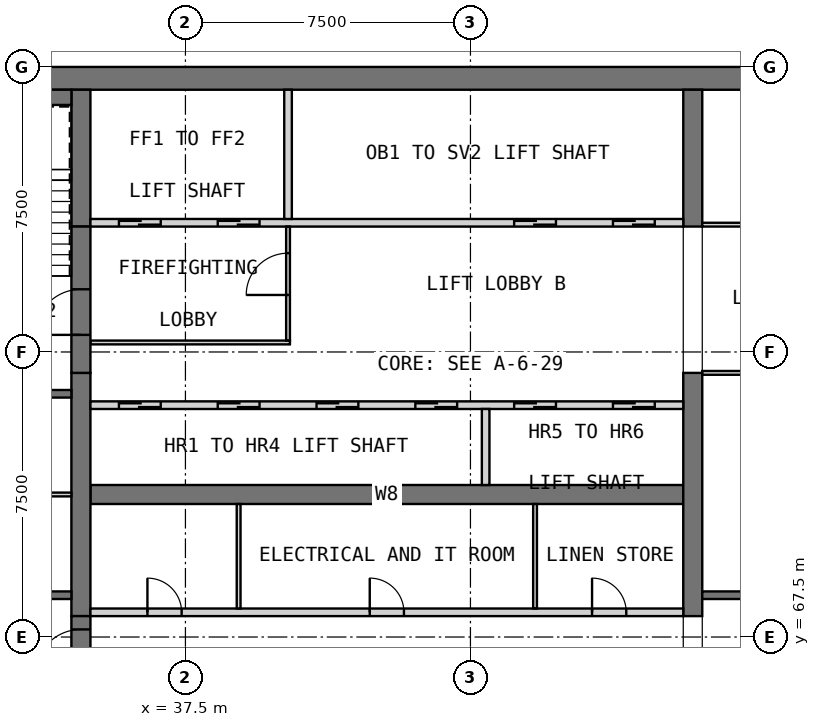
"""IFC4 building model, lengths in metres.
Left out: names, types, materials, properties, quantities, classifications, styles, units other than length and angle.
Written with IfcOpenShell. Run it as: python <this file> out.ifc"""

import sys

from ifc_helpers import new_model, si_unit, direction, frame, frame_2d, origin, place, context, subcontext, project, spatial, rectangle, extrude, element, fill, save


model = new_model("IFC4")
c1 = context("Model", 3, precision=1e-05, world=origin(), true_north=direction((0.0, 1.0)))
c2 = subcontext(c1, "Body", "Model", "MODEL_VIEW")
j1 = project(units=[si_unit("LENGTHUNIT", "METRE"), si_unit("PLANEANGLEUNIT", "RADIAN")], contexts=[c1])
p1 = place(None, origin())
s1 = spatial("IfcSite", under=j1, at=p1, CompositionType="ELEMENT")
p2 = place(p1, origin())
s2 = spatial("IfcBuilding", under=s1, at=p2, CompositionType="ELEMENT")
p3 = place(p2, frame((0.0, 0.0, 219.7)))
s3 = spatial("IfcBuildingStorey", under=s2, at=p3, CompositionType="ELEMENT", Elevation=219.7)
p4 = place(p3, frame((30.0, 82.2, 0.0), z_axis=(0.0, 0.0, 1.0), x_axis=(1.0, 0.0, 0.0)))
e1 = element("IfcWall", 1, at=p4, inside=s3, PredefinedType="SHEAR", context=c2, shape_type="SweptSolid", body=[
    extrude(rectangle(XDim=30.0, YDim=0.6, at=frame_2d((15.0, 0.0))), origin(), (0.0, 0.0, 1.0), 3.5),
])
p5 = place(p3, frame((35.0, 71.25, 0.0), z_axis=(0.0, 0.0, 1.0), x_axis=(1.0, 0.0, 0.0)))
e2 = element("IfcWall", 2, at=p5, inside=s3, PredefinedType="SHEAR", context=c2, shape_type="SweptSolid", body=[
    extrude(rectangle(XDim=15.6, YDim=0.5, at=frame_2d((7.8, 0.0))), origin(), (0.0, 0.0, 1.0), 3.5),
])
p6 = place(p3, frame((34.75, 68.05, 0.0), z_axis=(0.0, 0.0, 1.0), x_axis=(0.0, 1.0, 0.0)))
e3 = element("IfcWall", 3, at=p6, inside=s3, PredefinedType="SHEAR", context=c2, shape_type="SweptSolid", body=[
    extrude(rectangle(XDim=6.4, YDim=0.5, at=frame_2d((3.2, 0.0))), origin(), (0.0, 0.0, 1.0), 3.5),
])
p7 = place(p3, frame((34.75, 78.3, 0.0), z_axis=(0.0, 0.0, 1.0), x_axis=(0.0, 1.0, 0.0)))
e4 = element("IfcWall", 4, at=p7, inside=s3, PredefinedType="SHEAR", context=c2, shape_type="SweptSolid", body=[
    extrude(rectangle(XDim=3.6, YDim=0.5, at=frame_2d((1.8, 0.0))), origin(), (0.0, 0.0, 1.0), 3.5),
])
p8 = place(p3, frame((50.85, 68.05, 0.0), z_axis=(0.0, 0.0, 1.0), x_axis=(0.0, 1.0, 0.0)))
e5 = element("IfcWall", 5, at=p8, inside=s3, PredefinedType="SHEAR", context=c2, shape_type="SweptSolid", body=[
    extrude(rectangle(XDim=6.4, YDim=0.5, at=frame_2d((3.2, 0.0))), origin(), (0.0, 0.0, 1.0), 3.5),
])
p9 = place(p3, frame((50.85, 78.3, 0.0), z_axis=(0.0, 0.0, 1.0), x_axis=(0.0, 1.0, 0.0)))
e6 = element("IfcWall", 6, at=p9, inside=s3, PredefinedType="SHEAR", context=c2, shape_type="SweptSolid", body=[
    extrude(rectangle(XDim=3.6, YDim=0.5, at=frame_2d((1.8, 0.0))), origin(), (0.0, 0.0, 1.0), 3.5),
])
p10 = place(p3, frame((35.0, 68.15, 0.0), z_axis=(0.0, 0.0, 1.0), x_axis=(1.0, 0.0, 0.0)))
e7 = element("IfcWall", 7, at=p10, inside=s3, PredefinedType="PARTITIONING", context=c2, shape_type="SweptSolid", body=[
    extrude(rectangle(XDim=15.6, YDim=0.2, at=frame_2d((7.8, 0.0))), origin(), (0.0, 0.0, 1.0), 3.25),
])
p11 = place(p10, frame((1.5, 0.0, 0.0)))
e8 = element("IfcOpeningElement", 8, at=p11, cuts=e7, PredefinedType="OPENING", context=c2, shape_type="SweptSolid", body=[
    extrude(rectangle(XDim=0.9, YDim=2.1, at=frame_2d((0.45, 1.05))), frame((0.0, 0.11, 0.0), z_axis=(0.0, -1.0, 0.0), x_axis=(1.0, 0.0, 0.0)), (0.0, 0.0, 1.0), 0.22),
])
p12 = place(p10, frame((7.35, 0.0, 0.0)))
e9 = element("IfcOpeningElement", 9, at=p12, cuts=e7, PredefinedType="OPENING", context=c2, shape_type="SweptSolid", body=[
    extrude(rectangle(XDim=0.9, YDim=2.1, at=frame_2d((0.45, 1.05))), frame((0.0, 0.11, 0.0), z_axis=(0.0, -1.0, 0.0), x_axis=(1.0, 0.0, 0.0)), (0.0, 0.0, 1.0), 0.22),
])
p13 = place(p10, frame((13.2, 0.0, 0.0)))
e10 = element("IfcOpeningElement", 10, at=p13, cuts=e7, PredefinedType="OPENING", context=c2, shape_type="SweptSolid", body=[
    extrude(rectangle(XDim=0.9, YDim=2.1, at=frame_2d((0.45, 1.05))), frame((0.0, 0.11, 0.0), z_axis=(0.0, -1.0, 0.0), x_axis=(1.0, 0.0, 0.0)), (0.0, 0.0, 1.0), 0.22),
])
for number, where, z_axis, x_axis in (
    (11, (38.9, 68.25, 0.0), (0.0, 0.0, 1.0), (0.0, 1.0, 0.0)),
    (12, (46.7, 68.25, 0.0), (0.0, 0.0, 1.0), (0.0, 1.0, 0.0)),
):
    element("IfcWall", number, at=place(p3, frame(where, z_axis=z_axis, x_axis=x_axis)), inside=s3, PredefinedType="PARTITIONING", context=c2, shape_type="SweptSolid", body=[
        extrude(rectangle(XDim=2.75, YDim=0.1, at=frame_2d((1.375, 0.0))), origin(), (0.0, 0.0, 1.0), 3.25),
    ])
p14 = place(p3, frame((35.0, 73.6, 0.0), z_axis=(0.0, 0.0, 1.0), x_axis=(1.0, 0.0, 0.0)))
e13 = element("IfcWall", 13, at=p14, inside=s3, PredefinedType="SOLIDWALL", context=c2, shape_type="SweptSolid", body=[
    extrude(rectangle(XDim=15.6, YDim=0.2, at=frame_2d((7.8, 0.0))), origin(), (0.0, 0.0, 1.0), 3.5),
])
p15 = place(p14, frame((0.75, 0.0, 0.0)))
e14 = element("IfcOpeningElement", 14, at=p15, cuts=e13, PredefinedType="OPENING", context=c2, shape_type="SweptSolid", body=[
    extrude(rectangle(XDim=1.1, YDim=2.1, at=frame_2d((0.55, 1.05))), frame((0.0, 0.11, 0.0), z_axis=(0.0, -1.0, 0.0), x_axis=(1.0, 0.0, 0.0)), (0.0, 0.0, 1.0), 0.22),
])
p16 = place(p14, frame((3.35, 0.0, 0.0)))
e15 = element("IfcOpeningElement", 15, at=p16, cuts=e13, PredefinedType="OPENING", context=c2, shape_type="SweptSolid", body=[
    extrude(rectangle(XDim=1.1, YDim=2.1, at=frame_2d((0.55, 1.05))), frame((0.0, 0.11, 0.0), z_axis=(0.0, -1.0, 0.0), x_axis=(1.0, 0.0, 0.0)), (0.0, 0.0, 1.0), 0.22),
])
p17 = place(p14, frame((5.95, 0.0, 0.0)))
e16 = element("IfcOpeningElement", 16, at=p17, cuts=e13, PredefinedType="OPENING", context=c2, shape_type="SweptSolid", body=[
    extrude(rectangle(XDim=1.1, YDim=2.1, at=frame_2d((0.55, 1.05))), frame((0.0, 0.11, 0.0), z_axis=(0.0, -1.0, 0.0), x_axis=(1.0, 0.0, 0.0)), (0.0, 0.0, 1.0), 0.22),
])
p18 = place(p14, frame((8.55, 0.0, 0.0)))
e17 = element("IfcOpeningElement", 17, at=p18, cuts=e13, PredefinedType="OPENING", context=c2, shape_type="SweptSolid", body=[
    extrude(rectangle(XDim=1.1, YDim=2.1, at=frame_2d((0.55, 1.05))), frame((0.0, 0.11, 0.0), z_axis=(0.0, -1.0, 0.0), x_axis=(1.0, 0.0, 0.0)), (0.0, 0.0, 1.0), 0.22),
])
p19 = place(p14, frame((11.15, 0.0, 0.0)))
e18 = element("IfcOpeningElement", 18, at=p19, cuts=e13, PredefinedType="OPENING", context=c2, shape_type="SweptSolid", body=[
    extrude(rectangle(XDim=1.1, YDim=2.1, at=frame_2d((0.55, 1.05))), frame((0.0, 0.11, 0.0), z_axis=(0.0, -1.0, 0.0), x_axis=(1.0, 0.0, 0.0)), (0.0, 0.0, 1.0), 0.22),
])
p20 = place(p14, frame((13.75, 0.0, 0.0)))
e19 = element("IfcOpeningElement", 19, at=p20, cuts=e13, PredefinedType="OPENING", context=c2, shape_type="SweptSolid", body=[
    extrude(rectangle(XDim=1.1, YDim=2.1, at=frame_2d((0.55, 1.05))), frame((0.0, 0.11, 0.0), z_axis=(0.0, -1.0, 0.0), x_axis=(1.0, 0.0, 0.0)), (0.0, 0.0, 1.0), 0.22),
])
p21 = place(p3, frame((45.4, 71.5, 0.0), z_axis=(0.0, 0.0, 1.0), x_axis=(0.0, 1.0, 0.0)))
e20 = element("IfcWall", 20, at=p21, inside=s3, PredefinedType="SOLIDWALL", context=c2, shape_type="SweptSolid", body=[
    extrude(rectangle(XDim=2.0, YDim=0.2, at=frame_2d((1.0, 0.0))), origin(), (0.0, 0.0, 1.0), 3.5),
])
p22 = place(p3, frame((35.0, 78.4, 0.0), z_axis=(0.0, 0.0, 1.0), x_axis=(1.0, 0.0, 0.0)))
e21 = element("IfcWall", 21, at=p22, inside=s3, PredefinedType="SOLIDWALL", context=c2, shape_type="SweptSolid", body=[
    extrude(rectangle(XDim=15.6, YDim=0.2, at=frame_2d((7.8, 0.0))), origin(), (0.0, 0.0, 1.0), 3.5),
])
p23 = place(p22, frame((0.75, 0.0, 0.0)))
e22 = element("IfcOpeningElement", 22, at=p23, cuts=e21, PredefinedType="OPENING", context=c2, shape_type="SweptSolid", body=[
    extrude(rectangle(XDim=1.1, YDim=2.1, at=frame_2d((0.55, 1.05))), frame((0.0, 0.11, 0.0), z_axis=(0.0, -1.0, 0.0), x_axis=(1.0, 0.0, 0.0)), (0.0, 0.0, 1.0), 0.22),
])
p24 = place(p22, frame((3.35, 0.0, 0.0)))
e23 = element("IfcOpeningElement", 23, at=p24, cuts=e21, PredefinedType="OPENING", context=c2, shape_type="SweptSolid", body=[
    extrude(rectangle(XDim=1.1, YDim=2.1, at=frame_2d((0.55, 1.05))), frame((0.0, 0.11, 0.0), z_axis=(0.0, -1.0, 0.0), x_axis=(1.0, 0.0, 0.0)), (0.0, 0.0, 1.0), 0.22),
])
p25 = place(p22, frame((11.15, 0.0, 0.0)))
e24 = element("IfcOpeningElement", 24, at=p25, cuts=e21, PredefinedType="OPENING", context=c2, shape_type="SweptSolid", body=[
    extrude(rectangle(XDim=1.1, YDim=2.1, at=frame_2d((0.55, 1.05))), frame((0.0, 0.11, 0.0), z_axis=(0.0, -1.0, 0.0), x_axis=(1.0, 0.0, 0.0)), (0.0, 0.0, 1.0), 0.22),
])
p26 = place(p22, frame((13.75, 0.0, 0.0)))
e25 = element("IfcOpeningElement", 25, at=p26, cuts=e21, PredefinedType="OPENING", context=c2, shape_type="SweptSolid", body=[
    extrude(rectangle(XDim=1.1, YDim=2.1, at=frame_2d((0.55, 1.05))), frame((0.0, 0.11, 0.0), z_axis=(0.0, -1.0, 0.0), x_axis=(1.0, 0.0, 0.0)), (0.0, 0.0, 1.0), 0.22),
])
p27 = place(p3, frame((40.2, 78.5, 0.0), z_axis=(0.0, 0.0, 1.0), x_axis=(0.0, 1.0, 0.0)))
e26 = element("IfcWall", 26, at=p27, inside=s3, PredefinedType="SOLIDWALL", context=c2, shape_type="SweptSolid", body=[
    extrude(rectangle(XDim=3.4, YDim=0.2, at=frame_2d((1.7, 0.0))), origin(), (0.0, 0.0, 1.0), 3.5),
])
p28 = place(p3, frame((35.0, 75.25, 0.0), z_axis=(0.0, 0.0, 1.0), x_axis=(1.0, 0.0, 0.0)))
e27 = element("IfcWall", 27, at=p28, inside=s3, PredefinedType="PARTITIONING", context=c2, shape_type="SweptSolid", body=[
    extrude(rectangle(XDim=5.25, YDim=0.1, at=frame_2d((2.625, 0.0))), origin(), (0.0, 0.0, 1.0), 3.25),
])
p29 = place(p3, frame((40.2, 75.3, 0.0), z_axis=(0.0, 0.0, 1.0), x_axis=(0.0, 1.0, 0.0)))
e28 = element("IfcWall", 28, at=p29, inside=s3, PredefinedType="PARTITIONING", context=c2, shape_type="SweptSolid", body=[
    extrude(rectangle(XDim=3.0, YDim=0.1, at=frame_2d((1.5, 0.0))), origin(), (0.0, 0.0, 1.0), 3.25),
])
p30 = place(p29, frame((1.2, 0.0, 0.0)))
e29 = element("IfcOpeningElement", 29, at=p30, cuts=e28, PredefinedType="OPENING", context=c2, shape_type="SweptSolid", body=[
    extrude(rectangle(XDim=1.1, YDim=2.1, at=frame_2d((0.55, 1.05))), frame((0.0, 0.06, 0.0), z_axis=(0.0, -1.0, 0.0), x_axis=(1.0, 0.0, 0.0)), (0.0, 0.0, 1.0), 0.12),
])
p31 = place(p3, frame((34.75, 64.2, 0.0), z_axis=(0.0, 0.0, 1.0), x_axis=(0.0, 1.0, 0.0)))
e30 = element("IfcWall", 30, at=p31, inside=s3, PredefinedType="SOLIDWALL", context=c2, shape_type="SweptSolid", body=[
    extrude(rectangle(XDim=3.85, YDim=0.5, at=frame_2d((1.925, 0.0))), origin(), (0.0, 0.0, 1.0), 2.3),
])
p32 = place(p31, frame((2.3, 0.0, 0.0)))
e31 = element("IfcOpeningElement", 31, at=p32, cuts=e30, PredefinedType="OPENING", context=c2, shape_type="SweptSolid", body=[
    extrude(rectangle(XDim=1.2, YDim=2.1, at=frame_2d((0.6, 1.05))), frame((0.0, 0.26, 0.0), z_axis=(0.0, -1.0, 0.0), x_axis=(1.0, 0.0, 0.0)), (0.0, 0.0, 1.0), 0.52),
])
p33 = place(p3, frame((34.75, 74.45, 0.0), z_axis=(0.0, 0.0, 1.0), x_axis=(0.0, 1.0, 0.0)))
e32 = element("IfcWall", 32, at=p33, inside=s3, PredefinedType="SOLIDWALL", context=c2, shape_type="SweptSolid", body=[
    extrude(rectangle(XDim=3.85, YDim=0.5, at=frame_2d((1.925, 0.0))), origin(), (0.0, 0.0, 1.0), 2.3),
])
p34 = place(p33, frame((1.0, 0.0, 0.0)))
e33 = element("IfcOpeningElement", 33, at=p34, cuts=e32, PredefinedType="OPENING", context=c2, shape_type="SweptSolid", body=[
    extrude(rectangle(XDim=1.2, YDim=2.1, at=frame_2d((0.6, 1.05))), frame((0.0, 0.26, 0.0), z_axis=(0.0, -1.0, 0.0), x_axis=(1.0, 0.0, 0.0)), (0.0, 0.0, 1.0), 0.52),
])
p35 = place(p3, frame((30.6, 68.6, 0.0), z_axis=(0.0, 0.0, 1.0), x_axis=(1.0, 0.0, 0.0)))
e34 = element("IfcWall", 34, at=p35, inside=s3, PredefinedType="SOLIDWALL", context=c2, shape_type="SweptSolid", body=[
    extrude(rectangle(XDim=3.9, YDim=0.2, at=frame_2d((1.95, 0.0))), origin(), (0.0, 0.0, 1.0), 3.25),
])
p36 = place(p35, frame((1.7, 0.0, 0.0)))
e35 = element("IfcOpeningElement", 35, at=p36, cuts=e34, PredefinedType="OPENING", context=c2, shape_type="SweptSolid", body=[
    extrude(rectangle(XDim=0.9, YDim=2.1, at=frame_2d((0.45, 1.05))), frame((0.0, 0.11, 0.0), z_axis=(0.0, -1.0, 0.0), x_axis=(1.0, 0.0, 0.0)), (0.0, 0.0, 1.0), 0.22),
])
p37 = place(p3, frame((30.6, 73.9, 0.0), z_axis=(0.0, 0.0, 1.0), x_axis=(1.0, 0.0, 0.0)))
e36 = element("IfcWall", 36, at=p37, inside=s3, PredefinedType="SOLIDWALL", context=c2, shape_type="SweptSolid", body=[
    extrude(rectangle(XDim=3.9, YDim=0.2, at=frame_2d((1.95, 0.0))), origin(), (0.0, 0.0, 1.0), 3.25),
])
p38 = place(p37, frame((1.7, 0.0, 0.0)))
e37 = element("IfcOpeningElement", 37, at=p38, cuts=e36, PredefinedType="OPENING", context=c2, shape_type="SweptSolid", body=[
    extrude(rectangle(XDim=0.9, YDim=2.1, at=frame_2d((0.45, 1.05))), frame((0.0, 0.11, 0.0), z_axis=(0.0, -1.0, 0.0), x_axis=(1.0, 0.0, 0.0)), (0.0, 0.0, 1.0), 0.22),
])
p39 = place(p3, frame((51.1, 68.6, 0.0), z_axis=(0.0, 0.0, 1.0), x_axis=(1.0, 0.0, 0.0)))
e38 = element("IfcWall", 38, at=p39, inside=s3, PredefinedType="SOLIDWALL", context=c2, shape_type="SweptSolid", body=[
    extrude(rectangle(XDim=8.3, YDim=0.2, at=frame_2d((4.15, 0.0))), origin(), (0.0, 0.0, 1.0), 3.25),
])
p40 = place(p3, frame((31.0, 81.7, 0.0), z_axis=(0.0, 0.0, 1.0), x_axis=(1.0, 0.0, 0.0)))
e39 = element("IfcWall", 39, at=p40, inside=s3, PredefinedType="SOLIDWALL", context=c2, shape_type="SweptSolid", body=[
    extrude(rectangle(XDim=3.5, YDim=0.4, at=frame_2d((1.75, 0.0))), origin(), (0.0, 0.0, 1.0), 3.25),
])
p41 = place(p3, frame((30.6, 71.25, 0.0), z_axis=(0.0, 0.0, 1.0), x_axis=(1.0, 0.0, 0.0)))
e40 = element("IfcWall", 40, at=p41, inside=s3, PredefinedType="PARTITIONING", context=c2, shape_type="SweptSolid", body=[
    extrude(rectangle(XDim=3.9, YDim=0.1, at=frame_2d((1.95, 0.0))), origin(), (0.0, 0.0, 1.0), 3.25),
])
p42 = place(p3, frame((51.1, 74.45, 0.0), z_axis=(0.0, 0.0, 1.0), x_axis=(1.0, 0.0, 0.0)))
e41 = element("IfcWall", 41, at=p42, inside=s3, PredefinedType="PARTITIONING", context=c2, shape_type="SweptSolid", body=[
    extrude(rectangle(XDim=8.3, YDim=0.1, at=frame_2d((4.15, 0.0))), origin(), (0.0, 0.0, 1.0), 3.25),
])
p43 = place(p42, frame((3.7, 0.0, 0.0)))
e42 = element("IfcOpeningElement", 42, at=p43, cuts=e41, PredefinedType="OPENING", context=c2, shape_type="SweptSolid", body=[
    extrude(rectangle(XDim=0.9, YDim=2.1, at=frame_2d((0.45, 1.05))), frame((0.0, 0.06, 0.0), z_axis=(0.0, -1.0, 0.0), x_axis=(1.0, 0.0, 0.0)), (0.0, 0.0, 1.0), 0.12),
])
p44 = place(p3, frame((51.1, 78.35, 0.0), z_axis=(0.0, 0.0, 1.0), x_axis=(1.0, 0.0, 0.0)))
e43 = element("IfcWall", 43, at=p44, inside=s3, PredefinedType="PARTITIONING", context=c2, shape_type="SweptSolid", body=[
    extrude(rectangle(XDim=8.3, YDim=0.1, at=frame_2d((4.15, 0.0))), origin(), (0.0, 0.0, 1.0), 3.25),
])
p45 = place(p44, frame((3.7, 0.0, 0.0)))
e44 = element("IfcOpeningElement", 44, at=p45, cuts=e43, PredefinedType="OPENING", context=c2, shape_type="SweptSolid", body=[
    extrude(rectangle(XDim=0.9, YDim=2.1, at=frame_2d((0.45, 1.05))), frame((0.0, 0.06, 0.0), z_axis=(0.0, -1.0, 0.0), x_axis=(1.0, 0.0, 0.0)), (0.0, 0.0, 1.0), 0.12),
])
p46 = place(p11, origin())
e45 = element("IfcDoor", 45, at=p46, inside=s3, OperationType="SINGLE_SWING_RIGHT", PredefinedType="DOOR", context=c2, shape_type="SweptSolid", body=[
    extrude(rectangle(XDim=0.9, YDim=2.1, at=frame_2d((0.45, 1.05))), frame((0.0, 0.025, 0.0), z_axis=(0.0, -1.0, 0.0), x_axis=(1.0, 0.0, 0.0)), (0.0, 0.0, 1.0), 0.05),
])
fill(e8, e45)
p47 = place(p12, origin())
e46 = element("IfcDoor", 46, at=p47, inside=s3, OperationType="SINGLE_SWING_LEFT", PredefinedType="DOOR", context=c2, shape_type="SweptSolid", body=[
    extrude(rectangle(XDim=0.9, YDim=2.1, at=frame_2d((0.45, 1.05))), frame((0.0, 0.025, 0.0), z_axis=(0.0, -1.0, 0.0), x_axis=(1.0, 0.0, 0.0)), (0.0, 0.0, 1.0), 0.05),
])
fill(e9, e46)
p48 = place(p13, origin())
e47 = element("IfcDoor", 47, at=p48, inside=s3, OperationType="SINGLE_SWING_RIGHT", PredefinedType="DOOR", context=c2, shape_type="SweptSolid", body=[
    extrude(rectangle(XDim=0.9, YDim=2.1, at=frame_2d((0.45, 1.05))), frame((0.0, 0.025, 0.0), z_axis=(0.0, -1.0, 0.0), x_axis=(1.0, 0.0, 0.0)), (0.0, 0.0, 1.0), 0.05),
])
fill(e10, e47)
p49 = place(p15, origin())
e48 = element("IfcDoor", 48, at=p49, inside=s3, OperationType="DOUBLE_DOOR_SLIDING", PredefinedType="DOOR", context=c2, shape_type="SweptSolid", body=[
    extrude(rectangle(XDim=1.1, YDim=2.1, at=frame_2d((0.55, 1.05))), frame((0.0, 0.025, 0.0), z_axis=(0.0, -1.0, 0.0), x_axis=(1.0, 0.0, 0.0)), (0.0, 0.0, 1.0), 0.05),
])
fill(e14, e48)
p50 = place(p16, origin())
e49 = element("IfcDoor", 49, at=p50, inside=s3, OperationType="DOUBLE_DOOR_SLIDING", PredefinedType="DOOR", context=c2, shape_type="SweptSolid", body=[
    extrude(rectangle(XDim=1.1, YDim=2.1, at=frame_2d((0.55, 1.05))), frame((0.0, 0.025, 0.0), z_axis=(0.0, -1.0, 0.0), x_axis=(1.0, 0.0, 0.0)), (0.0, 0.0, 1.0), 0.05),
])
fill(e15, e49)
p51 = place(p17, origin())
e50 = element("IfcDoor", 50, at=p51, inside=s3, OperationType="DOUBLE_DOOR_SLIDING", PredefinedType="DOOR", context=c2, shape_type="SweptSolid", body=[
    extrude(rectangle(XDim=1.1, YDim=2.1, at=frame_2d((0.55, 1.05))), frame((0.0, 0.025, 0.0), z_axis=(0.0, -1.0, 0.0), x_axis=(1.0, 0.0, 0.0)), (0.0, 0.0, 1.0), 0.05),
])
fill(e16, e50)
p52 = place(p18, origin())
e51 = element("IfcDoor", 51, at=p52, inside=s3, OperationType="DOUBLE_DOOR_SLIDING", PredefinedType="DOOR", context=c2, shape_type="SweptSolid", body=[
    extrude(rectangle(XDim=1.1, YDim=2.1, at=frame_2d((0.55, 1.05))), frame((0.0, 0.025, 0.0), z_axis=(0.0, -1.0, 0.0), x_axis=(1.0, 0.0, 0.0)), (0.0, 0.0, 1.0), 0.05),
])
fill(e17, e51)
p53 = place(p19, origin())
e52 = element("IfcDoor", 52, at=p53, inside=s3, OperationType="DOUBLE_DOOR_SLIDING", PredefinedType="DOOR", context=c2, shape_type="SweptSolid", body=[
    extrude(rectangle(XDim=1.1, YDim=2.1, at=frame_2d((0.55, 1.05))), frame((0.0, 0.025, 0.0), z_axis=(0.0, -1.0, 0.0), x_axis=(1.0, 0.0, 0.0)), (0.0, 0.0, 1.0), 0.05),
])
fill(e18, e52)
p54 = place(p20, origin())
e53 = element("IfcDoor", 53, at=p54, inside=s3, OperationType="DOUBLE_DOOR_SLIDING", PredefinedType="DOOR", context=c2, shape_type="SweptSolid", body=[
    extrude(rectangle(XDim=1.1, YDim=2.1, at=frame_2d((0.55, 1.05))), frame((0.0, 0.025, 0.0), z_axis=(0.0, -1.0, 0.0), x_axis=(1.0, 0.0, 0.0)), (0.0, 0.0, 1.0), 0.05),
])
fill(e19, e53)
p55 = place(p23, origin())
e54 = element("IfcDoor", 54, at=p55, inside=s3, OperationType="DOUBLE_DOOR_SLIDING", PredefinedType="DOOR", context=c2, shape_type="SweptSolid", body=[
    extrude(rectangle(XDim=1.1, YDim=2.1, at=frame_2d((0.55, 1.05))), frame((0.0, 0.025, 0.0), z_axis=(0.0, -1.0, 0.0), x_axis=(1.0, 0.0, 0.0)), (0.0, 0.0, 1.0), 0.05),
])
fill(e22, e54)
p56 = place(p24, origin())
e55 = element("IfcDoor", 55, at=p56, inside=s3, OperationType="DOUBLE_DOOR_SLIDING", PredefinedType="DOOR", context=c2, shape_type="SweptSolid", body=[
    extrude(rectangle(XDim=1.1, YDim=2.1, at=frame_2d((0.55, 1.05))), frame((0.0, 0.025, 0.0), z_axis=(0.0, -1.0, 0.0), x_axis=(1.0, 0.0, 0.0)), (0.0, 0.0, 1.0), 0.05),
])
fill(e23, e55)
p57 = place(p25, origin())
e56 = element("IfcDoor", 56, at=p57, inside=s3, OperationType="DOUBLE_DOOR_SLIDING", PredefinedType="DOOR", context=c2, shape_type="SweptSolid", body=[
    extrude(rectangle(XDim=1.1, YDim=2.1, at=frame_2d((0.55, 1.05))), frame((0.0, 0.025, 0.0), z_axis=(0.0, -1.0, 0.0), x_axis=(1.0, 0.0, 0.0)), (0.0, 0.0, 1.0), 0.05),
])
fill(e24, e56)
p58 = place(p26, origin())
e57 = element("IfcDoor", 57, at=p58, inside=s3, OperationType="DOUBLE_DOOR_SLIDING", PredefinedType="DOOR", context=c2, shape_type="SweptSolid", body=[
    extrude(rectangle(XDim=1.1, YDim=2.1, at=frame_2d((0.55, 1.05))), frame((0.0, 0.025, 0.0), z_axis=(0.0, -1.0, 0.0), x_axis=(1.0, 0.0, 0.0)), (0.0, 0.0, 1.0), 0.05),
])
fill(e25, e57)
p59 = place(p30, origin())
e58 = element("IfcDoor", 58, at=p59, inside=s3, OperationType="SINGLE_SWING_LEFT", PredefinedType="DOOR", context=c2, shape_type="SweptSolid", body=[
    extrude(rectangle(XDim=1.1, YDim=2.1, at=frame_2d((0.55, 1.05))), frame((0.0, 0.025, 0.0), z_axis=(0.0, -1.0, 0.0), x_axis=(1.0, 0.0, 0.0)), (0.0, 0.0, 1.0), 0.05),
])
fill(e29, e58)
p60 = place(p32, origin())
e59 = element("IfcDoor", 59, at=p60, inside=s3, OperationType="SINGLE_SWING_LEFT", PredefinedType="DOOR", context=c2, shape_type="SweptSolid", body=[
    extrude(rectangle(XDim=1.2, YDim=2.1, at=frame_2d((0.6, 1.05))), frame((0.0, 0.025, 0.0), z_axis=(0.0, -1.0, 0.0), x_axis=(1.0, 0.0, 0.0)), (0.0, 0.0, 1.0), 0.05),
])
fill(e31, e59)
p61 = place(p34, origin())
e60 = element("IfcDoor", 60, at=p61, inside=s3, OperationType="SINGLE_SWING_RIGHT", PredefinedType="DOOR", context=c2, shape_type="SweptSolid", body=[
    extrude(rectangle(XDim=1.2, YDim=2.1, at=frame_2d((0.6, 1.05))), frame((0.0, 0.025, 0.0), z_axis=(0.0, -1.0, 0.0), x_axis=(1.0, 0.0, 0.0)), (0.0, 0.0, 1.0), 0.05),
])
fill(e33, e60)
save(model, sys.argv[1])
